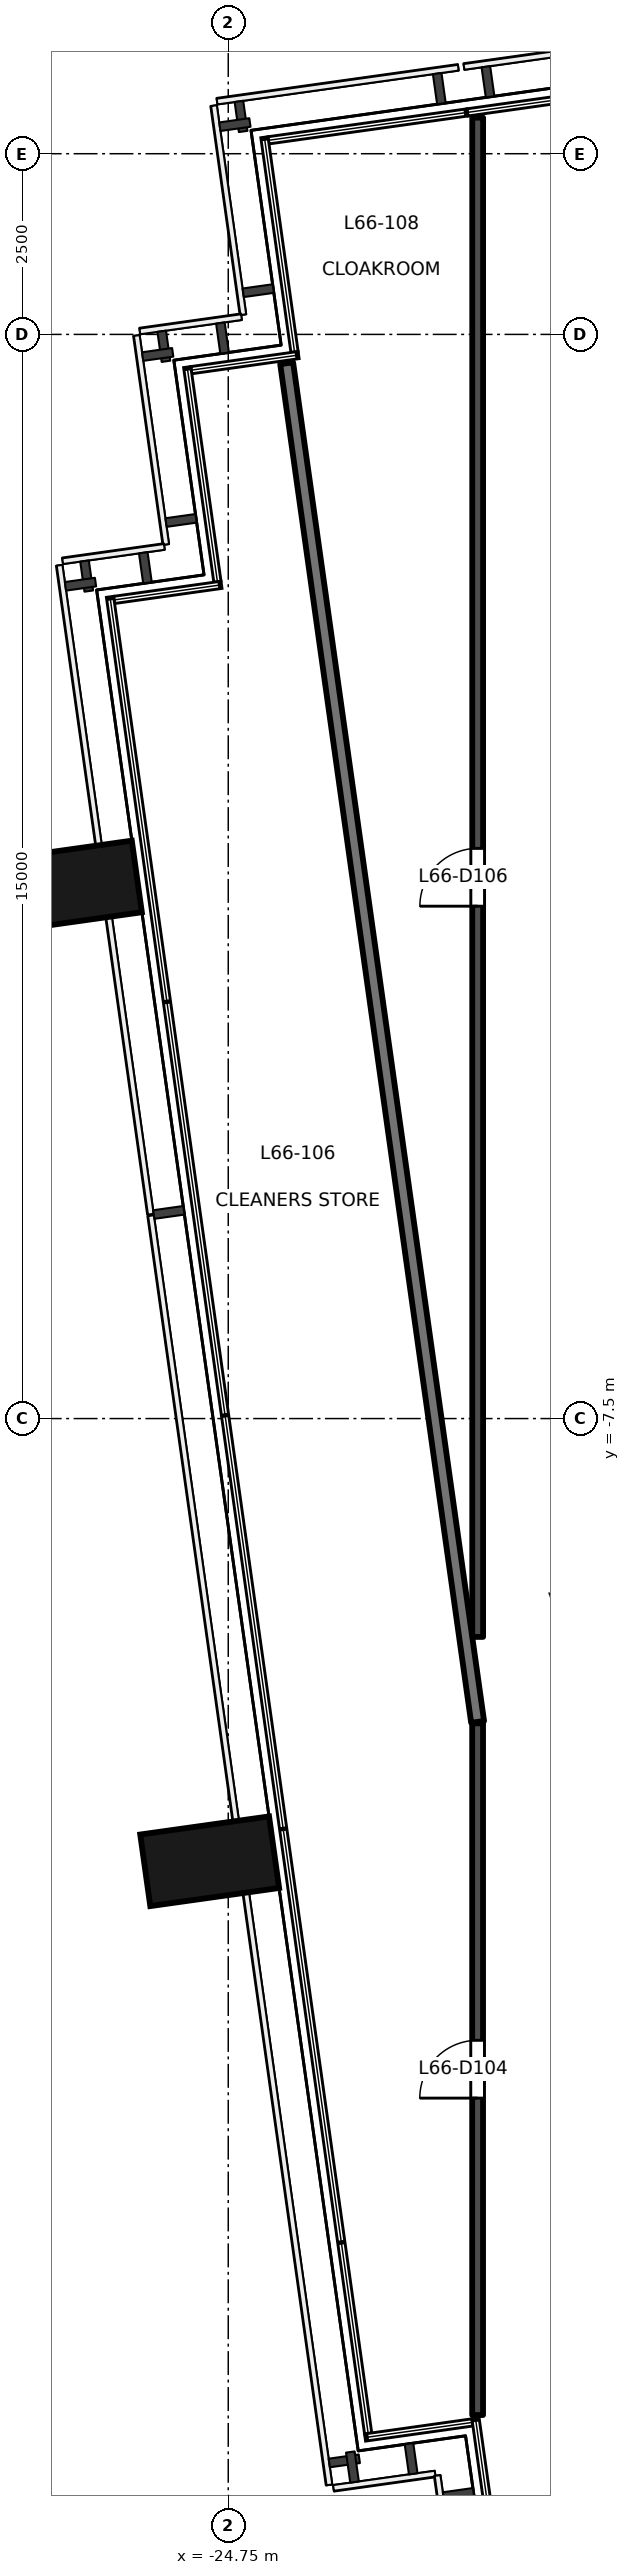
"""IFC4 building model, lengths in metres.
Left out: names, types, materials, properties, quantities, classifications, styles, units other than length and angle.
Written with IfcOpenShell. Run it as: python <this file> out.ifc"""

import sys

from ifc_helpers import new_model, si_unit, direction, frame, frame_2d, origin, origin_2d, place, context, subcontext, project, spatial, rectangle, extrude, element, fill, save


model = new_model("IFC4")
c1 = context("Model", 3, precision=1e-05, world=origin(), true_north=direction((0.0, 1.0)))
c2 = subcontext(c1, "Body", "Model", "MODEL_VIEW")
j1 = project(units=[si_unit("LENGTHUNIT", "METRE"), si_unit("PLANEANGLEUNIT", "RADIAN")], contexts=[c1])
p1 = place(None, origin())
s1 = spatial("IfcSite", under=j1, at=p1, CompositionType="ELEMENT")
p2 = place(p1, origin())
s2 = spatial("IfcBuilding", under=s1, at=p2, CompositionType="ELEMENT")
p3 = place(p2, frame((0.0, 0.0, 286.3)))
s3 = spatial("IfcBuildingStorey", under=s2, at=p3, CompositionType="ELEMENT", Elevation=286.3)
for number, where, z_axis, x_axis in (
    (1, (-25.007, -13.625, -0.2), (0.0, 0.0, 1.0), (-0.139, 0.99, 0.0)),
    (2, (-26.906, -0.125, -0.2), (0.0, 0.0, 1.0), (-0.139, 0.99, 0.0)),
):
    element("IfcColumn", number, at=place(p3, frame(where, z_axis=z_axis, x_axis=x_axis)), inside=s3, PredefinedType="COLUMN", context=c2, shape_type="SweptSolid", body=[
        extrude(rectangle(XDim=1.0, YDim=1.8, at=origin_2d()), origin(), (0.0, 0.0, 1.0), 6.0),
    ])
p4 = place(p3, frame((-21.3, -21.287, 0.0), z_axis=(0.0, 0.0, 1.0), x_axis=(0.0, 1.0, 0.0)))
e3 = element("IfcWall", 3, at=p4, inside=s3, PredefinedType="PARTITIONING", context=c2, shape_type="SweptSolid", body=[
    extrude(rectangle(XDim=9.57, YDim=0.15, at=frame_2d((4.785, 0.0))), origin(), (0.0, 0.0, 1.0), 3.75),
])
p5 = place(p4, frame((4.385, 0.0, 0.0)))
e4 = element("IfcOpeningElement", 4, at=p5, cuts=e3, PredefinedType="OPENING", context=c2, shape_type="SweptSolid", body=[
    extrude(rectangle(XDim=0.8, YDim=2.1, at=frame_2d((0.4, 1.05))), frame((0.0, 0.085, 0.0), z_axis=(0.0, -1.0, 0.0), x_axis=(1.0, 0.0, 0.0)), (0.0, 0.0, 1.0), 0.171),
])
p6 = place(p3, frame((-21.299, -10.521, 0.0), z_axis=(0.0, 0.0, 1.0), x_axis=(0.0, 1.0, 0.0)))
e5 = element("IfcWall", 5, at=p6, inside=s3, PredefinedType="PARTITIONING", context=c2, shape_type="SweptSolid", body=[
    extrude(rectangle(XDim=21.02, YDim=0.15, at=frame_2d((10.51, 0.0))), origin(), (0.0, 0.0, 1.0), 3.75),
])
p7 = place(p6, frame((10.11, 0.0, 0.0)))
e6 = element("IfcOpeningElement", 6, at=p7, cuts=e5, PredefinedType="OPENING", context=c2, shape_type="SweptSolid", body=[
    extrude(rectangle(XDim=0.8, YDim=2.1, at=frame_2d((0.4, 1.05))), frame((0.0, 0.085, 0.0), z_axis=(0.0, -1.0, 0.0), x_axis=(1.0, 0.0, 0.0)), (0.0, 0.0, 1.0), 0.171),
])
p8 = place(p3, frame((-23.942, 7.101, 0.0), z_axis=(0.0, 0.0, 1.0), x_axis=(0.139170292898, -0.990268463385, 0.0)))
e7 = element("IfcWall", 7, at=p8, inside=s3, PredefinedType="PARTITIONING", context=c2, shape_type="SweptSolid", body=[
    extrude(rectangle(XDim=18.983, YDim=0.18, at=frame_2d((9.491, 0.0))), origin(), (0.0, 0.0, 1.0), 3.75),
])
p9 = place(p5, origin())
e8 = element("IfcDoor", 8, at=p9, inside=s3, OperationType="SINGLE_SWING_LEFT", PredefinedType="DOOR", context=c2, shape_type="SweptSolid", body=[
    extrude(rectangle(XDim=0.8, YDim=2.1, at=frame_2d((0.4, 1.05))), frame((0.0, 0.025, 0.0), z_axis=(0.0, -1.0, 0.0), x_axis=(1.0, 0.0, 0.0)), (0.0, 0.0, 1.0), 0.05),
])
fill(e4, e8)
p10 = place(p7, origin())
e9 = element("IfcDoor", 9, at=p10, inside=s3, OperationType="SINGLE_SWING_LEFT", PredefinedType="DOOR", context=c2, shape_type="SweptSolid", body=[
    extrude(rectangle(XDim=0.8, YDim=2.1, at=frame_2d((0.4, 1.05))), frame((0.0, 0.025, 0.0), z_axis=(0.0, -1.0, 0.0), x_axis=(1.0, 0.0, 0.0)), (0.0, 0.0, 1.0), 0.05),
])
fill(e6, e9)
save(model, sys.argv[1])
